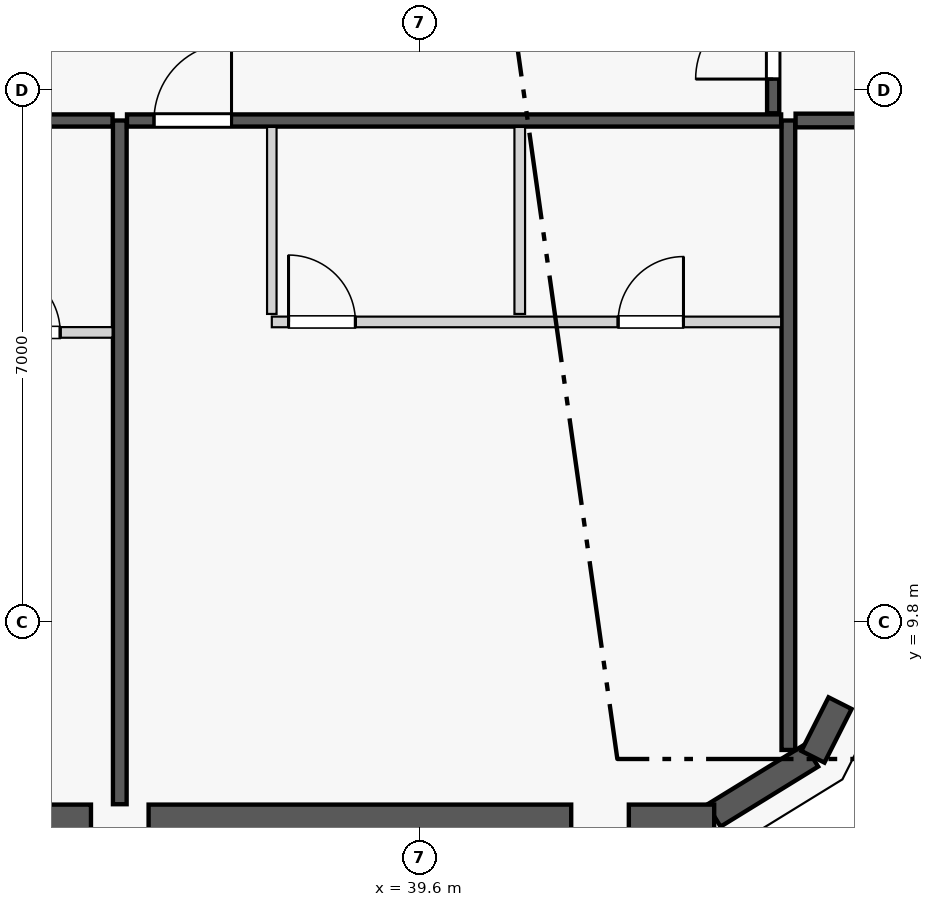
"""IFC4 building model, lengths in metres.
Left out: names, types, materials, properties, quantities, classifications, styles, units other than length and angle.
Written with IfcOpenShell. Run it as: python <this file> out.ifc"""

import sys

from ifc_helpers import new_model, si_unit, direction, frame, frame_2d, origin, origin_2d, place, context, subcontext, project, spatial, rectangle, extrude, element, fill, save


model = new_model("IFC4")
c1 = context("Model", 3, precision=1e-05, world=origin(), true_north=direction((0.0, 1.0)))
c2 = subcontext(c1, "Body", "Model", "MODEL_VIEW")
j1 = project(units=[si_unit("LENGTHUNIT", "METRE"), si_unit("PLANEANGLEUNIT", "RADIAN")], contexts=[c1])
p1 = place(None, origin())
s1 = spatial("IfcSite", under=j1, at=p1, CompositionType="ELEMENT")
p2 = place(p1, origin())
s2 = spatial("IfcBuilding", under=s1, at=p2, CompositionType="ELEMENT")
p3 = place(p2, frame((0.0, 0.0, 241.6)))
s3 = spatial("IfcBuildingStorey", under=s2, at=p3, CompositionType="ELEMENT", Elevation=241.6)
for number, where, z_axis, x_axis in (
    (1, (35.654, 7.292, 0.0), (0.0, 0.0, 1.0), (1.0, 0.0, 0.0)),
    (2, (41.972, 7.239, 0.0), (0.0, 0.0, 1.0), (1.0, 0.0, 0.0)),
    (3, (45.341, 9.191, 0.0), (0.0, 0.0, 1.0), (1.0, 0.0, 0.0)),
):
    element("IfcColumn", number, at=place(p3, frame(where, z_axis=z_axis, x_axis=x_axis)), inside=s3, PredefinedType="COLUMN", context=c2, shape_type="SweptSolid", body=[
        extrude(rectangle(XDim=0.75, YDim=0.75, at=origin_2d()), origin(), (0.0, 0.0, 1.0), 3.65),
    ])
p4 = place(p3, frame((43.657, 8.215, 0.0), z_axis=(0.0, 0.0, 1.0), x_axis=(0.865256437757, 0.501329529272, 0.0)))
e4 = element("IfcColumn", 4, at=p4, inside=s3, PredefinedType="PILASTER", context=c2, shape_type="SweptSolid", body=[
    extrude(rectangle(XDim=0.5, YDim=0.35, at=origin_2d()), origin(), (0.0, 0.0, 1.0), 3.65),
])
p5 = place(p3, frame((43.469, 7.255, 0.0), z_axis=(0.0, 0.0, 1.0), x_axis=(0.851680557619, 0.52406128246, 0.0)))
e5 = element("IfcWall", 5, at=p5, inside=s3, PredefinedType="STANDARD", context=c2, shape_type="SweptSolid", body=[
    extrude(rectangle(XDim=1.508, YDim=0.34, at=frame_2d((0.754, 0.0))), origin(), (0.0, 0.0, 1.0), 3.45),
])
p6 = place(p3, frame((29.525, 7.23, 0.0), z_axis=(0.0, 0.0, 1.0), x_axis=(1.0, 0.0, 0.0)))
e6 = element("IfcWall", 6, at=p6, inside=s3, PredefinedType="STANDARD", context=c2, shape_type="SweptSolid", body=[
    extrude(rectangle(XDim=5.75, YDim=0.34, at=frame_2d((2.875, 0.0))), origin(), (0.0, 0.0, 1.0), 2.983),
])
p7 = place(p6, frame((2.325, 0.0, 0.0)))
e7 = element("IfcOpeningElement", 7, at=p7, cuts=e6, PredefinedType="OPENING", context=c2, shape_type="SweptSolid", body=[
    extrude(rectangle(XDim=1.1, YDim=2.25, at=frame_2d((0.55, 1.125))), frame((0.0, 0.18, 0.0), z_axis=(0.0, -1.0, 0.0), x_axis=(1.0, 0.0, 0.0)), (0.0, 0.0, 1.0), 0.36),
])
p8 = place(p3, frame((36.033, 7.23, 0.0), z_axis=(0.0, 0.0, 1.0), x_axis=(1.0, 0.0, 0.0)))
e8 = element("IfcWall", 8, at=p8, inside=s3, PredefinedType="STANDARD", context=c2, shape_type="SweptSolid", body=[
    extrude(rectangle(XDim=5.56, YDim=0.34, at=frame_2d((2.78, 0.0))), origin(), (0.0, 0.0, 1.0), 2.983),
])
p9 = place(p8, frame((2.23, 0.0, 0.75)))
e9 = element("IfcOpeningElement", 9, at=p9, cuts=e8, PredefinedType="OPENING", context=c2, shape_type="SweptSolid", body=[
    extrude(rectangle(XDim=1.1, YDim=2.0, at=frame_2d((0.55, 1.0))), frame((0.0, 0.18, 0.0), z_axis=(0.0, -1.0, 0.0), x_axis=(1.0, 0.0, 0.0)), (0.0, 0.0, 1.0), 0.36),
])
p10 = place(p3, frame((42.351, 7.23, 0.0), z_axis=(0.0, 0.0, 1.0), x_axis=(1.0, 0.0, 0.0)))
e10 = element("IfcWall", 10, at=p10, inside=s3, PredefinedType="STANDARD", context=c2, shape_type="SweptSolid", body=[
    extrude(rectangle(XDim=1.123, YDim=0.34, at=frame_2d((0.562, 0.0))), origin(), (0.0, 0.0, 1.0), 3.45),
])
p11 = place(p3, frame((44.773, 8.029, 0.0), z_axis=(0.0, 0.0, 1.0), x_axis=(0.451159191899, 0.892443490404, 0.0)))
e11 = element("IfcWall", 11, at=p11, inside=s3, PredefinedType="STANDARD", context=c2, shape_type="SweptSolid", body=[
    extrude(rectangle(XDim=0.791, YDim=0.34, at=frame_2d((0.396, 0.0))), origin(), (0.0, 0.0, 1.0), 3.45),
])
p12 = place(p3, frame((35.654, 7.405, 0.0), z_axis=(0.0, 0.0, 1.0), x_axis=(0.0, 1.0, 0.0)))
e12 = element("IfcWall", 12, at=p12, inside=s3, PredefinedType="PARTITIONING", context=c2, shape_type="SweptSolid", body=[
    extrude(rectangle(XDim=8.995, YDim=0.18, at=frame_2d((4.498, 0.0))), origin(), (0.0, 0.0, 1.0), 2.907),
])
p13 = place(p3, frame((44.45, 8.119, 0.0), z_axis=(0.0, 0.0, 1.0), x_axis=(0.0, 1.0, 0.0)))
e13 = element("IfcWall", 13, at=p13, inside=s3, PredefinedType="PARTITIONING", context=c2, shape_type="SweptSolid", body=[
    extrude(rectangle(XDim=8.281, YDim=0.18, at=frame_2d((4.141, 0.0))), origin(), (0.0, 0.0, 1.0), 3.45),
])
p14 = place(p3, frame((29.241, 16.4, 0.0), z_axis=(0.0, 0.0, 1.0), x_axis=(1.0, 0.0, 0.0)))
e14 = element("IfcWall", 14, at=p14, inside=s3, PredefinedType="PARTITIONING", context=c2, shape_type="SweptSolid", body=[
    extrude(rectangle(XDim=6.318, YDim=0.16, at=frame_2d((3.159, 0.0))), origin(), (0.0, 0.0, 1.0), 3.45),
])
p15 = place(p14, frame((0.355, 0.0, 0.0)))
e15 = element("IfcOpeningElement", 15, at=p15, cuts=e14, PredefinedType="OPENING", context=c2, shape_type="SweptSolid", body=[
    extrude(rectangle(XDim=1.02, YDim=2.25, at=frame_2d((0.51, 1.125))), frame((0.0, 0.09, 0.0), z_axis=(0.0, -1.0, 0.0), x_axis=(1.0, 0.0, 0.0)), (0.0, 0.0, 1.0), 0.18),
])
p16 = place(p3, frame((31.146, 13.612, 0.0), z_axis=(0.0, 0.0, 1.0), x_axis=(1.0, 0.0, 0.0)))
e16 = element("IfcWall", 16, at=p16, inside=s3, PredefinedType="PLUMBINGWALL", context=c2, shape_type="SweptSolid", body=[
    extrude(rectangle(XDim=4.413, YDim=0.14, at=frame_2d((2.207, 0.0))), origin(), (0.0, 0.0, 1.0), 3.45),
])
p17 = place(p16, frame((2.864, 0.0, 0.0)))
e17 = element("IfcOpeningElement", 17, at=p17, cuts=e16, PredefinedType="OPENING", context=c2, shape_type="SweptSolid", body=[
    extrude(rectangle(XDim=0.86, YDim=2.1, at=frame_2d((0.43, 1.05))), frame((0.0, 0.08, 0.0), z_axis=(0.0, -1.0, 0.0), x_axis=(1.0, 0.0, 0.0)), (0.0, 0.0, 1.0), 0.16),
])
p18 = place(p16, frame((0.22, 0.0, 0.0)))
e18 = element("IfcOpeningElement", 18, at=p18, cuts=e16, PredefinedType="OPENING", context=c2, shape_type="SweptSolid", body=[
    extrude(rectangle(XDim=0.88, YDim=2.15, at=frame_2d((0.44, 1.075))), frame((0.0, 0.08, 0.0), z_axis=(0.0, -1.0, 0.0), x_axis=(1.0, 0.0, 0.0)), (0.0, 0.0, 1.0), 0.16),
])
p19 = place(p3, frame((35.749, 16.4, 0.0), z_axis=(0.0, 0.0, 1.0), x_axis=(1.0, 0.0, 0.0)))
e19 = element("IfcWall", 19, at=p19, inside=s3, PredefinedType="PARTITIONING", context=c2, shape_type="SweptSolid", body=[
    extrude(rectangle(XDim=8.606, YDim=0.16, at=frame_2d((4.303, 0.0))), origin(), (0.0, 0.0, 1.0), 3.45),
])
p20 = place(p19, frame((0.355, 0.0, 0.0)))
e20 = element("IfcOpeningElement", 20, at=p20, cuts=e19, PredefinedType="OPENING", context=c2, shape_type="SweptSolid", body=[
    extrude(rectangle(XDim=1.02, YDim=2.25, at=frame_2d((0.51, 1.125))), frame((0.0, 0.09, 0.0), z_axis=(0.0, -1.0, 0.0), x_axis=(1.0, 0.0, 0.0)), (0.0, 0.0, 1.0), 0.18),
])
p21 = place(p3, frame((37.654, 13.855, 0.0), z_axis=(0.0, 0.0, 1.0), x_axis=(0.0, 1.0, 0.0)))
e21 = element("IfcWall", 21, at=p21, inside=s3, PredefinedType="PARTITIONING", context=c2, shape_type="SweptSolid", body=[
    extrude(rectangle(XDim=2.46, YDim=0.125, at=frame_2d((1.23, 0.0))), origin(), (0.0, 0.0, 1.0), 3.45),
])
p22 = place(p3, frame((37.654, 13.75, 0.0), z_axis=(0.0, 0.0, 1.0), x_axis=(1.0, 0.0, 0.0)))
e22 = element("IfcWall", 22, at=p22, inside=s3, PredefinedType="PLUMBINGWALL", context=c2, shape_type="SweptSolid", body=[
    extrude(rectangle(XDim=6.701, YDim=0.14, at=frame_2d((3.351, 0.0))), origin(), (0.0, 0.0, 1.0), 3.45),
])
p23 = place(p22, frame((4.556, 0.0, 0.0)))
e23 = element("IfcOpeningElement", 23, at=p23, cuts=e22, PredefinedType="OPENING", context=c2, shape_type="SweptSolid", body=[
    extrude(rectangle(XDim=0.86, YDim=2.1, at=frame_2d((0.43, 1.05))), frame((0.0, 0.08, 0.0), z_axis=(0.0, -1.0, 0.0), x_axis=(1.0, 0.0, 0.0)), (0.0, 0.0, 1.0), 0.16),
])
p24 = place(p22, frame((0.22, 0.0, 0.0)))
e24 = element("IfcOpeningElement", 24, at=p24, cuts=e22, PredefinedType="OPENING", context=c2, shape_type="SweptSolid", body=[
    extrude(rectangle(XDim=0.88, YDim=2.15, at=frame_2d((0.44, 1.075))), frame((0.0, 0.08, 0.0), z_axis=(0.0, -1.0, 0.0), x_axis=(1.0, 0.0, 0.0)), (0.0, 0.0, 1.0), 0.16),
])
p25 = place(p3, frame((40.916, 13.855, 0.0), z_axis=(0.0, 0.0, 1.0), x_axis=(0.0, 1.0, 0.0)))
e25 = element("IfcWall", 25, at=p25, inside=s3, PredefinedType="PLUMBINGWALL", context=c2, shape_type="SweptSolid", body=[
    extrude(rectangle(XDim=2.46, YDim=0.14, at=frame_2d((1.23, 0.0))), origin(), (0.0, 0.0, 1.0), 3.45),
])
p26 = place(p3, frame((44.545, 16.4, 0.0), z_axis=(0.0, 0.0, 1.0), x_axis=(1.0, 0.0, 0.0)))
e26 = element("IfcWall", 26, at=p26, inside=s3, PredefinedType="PARTITIONING", context=c2, shape_type="SweptSolid", body=[
    extrude(rectangle(XDim=4.221, YDim=0.18, at=frame_2d((2.111, 0.0))), origin(), (0.0, 0.0, 1.0), 3.45),
])
p27 = place(p3, frame((44.25, 16.495, 0.0), z_axis=(0.0, 0.0, 1.0), x_axis=(0.0, 1.0, 0.0)))
e27 = element("IfcWall", 27, at=p27, inside=s3, PredefinedType="PARTITIONING", context=c2, shape_type="SweptSolid", body=[
    extrude(rectangle(XDim=18.41, YDim=0.16, at=frame_2d((9.205, 0.0))), origin(), (0.0, 0.0, 1.0), 3.137),
])
p28 = place(p27, frame((0.45, 0.0, 0.0)))
e28 = element("IfcOpeningElement", 28, at=p28, cuts=e27, PredefinedType="OPENING", context=c2, shape_type="SweptSolid", body=[
    extrude(rectangle(XDim=1.02, YDim=2.25, at=frame_2d((0.51, 1.125))), frame((0.0, 0.09, 0.0), z_axis=(0.0, -1.0, 0.0), x_axis=(1.0, 0.0, 0.0)), (0.0, 0.0, 1.0), 0.18),
])
p29 = place(p9, origin())
e29 = element("IfcWindow", 29, at=p29, inside=s3, PartitioningType="SINGLE_PANEL", PredefinedType="WINDOW", context=c2, shape_type="SweptSolid", body=[
    extrude(rectangle(XDim=1.1, YDim=2.0, at=frame_2d((0.55, 1.0))), frame((0.0, 0.03, 0.0), z_axis=(0.0, -1.0, 0.0), x_axis=(1.0, 0.0, 0.0)), (0.0, 0.0, 1.0), 0.06),
])
fill(e9, e29)
p30 = place(p17, origin())
e30 = element("IfcDoor", 30, at=p30, inside=s3, OperationType="SINGLE_SWING_LEFT", PredefinedType="DOOR", context=c2, shape_type="SweptSolid", body=[
    extrude(rectangle(XDim=0.86, YDim=2.1, at=frame_2d((0.43, 1.05))), frame((0.0, 0.025, 0.0), z_axis=(0.0, -1.0, 0.0), x_axis=(1.0, 0.0, 0.0)), (0.0, 0.0, 1.0), 0.05),
])
fill(e17, e30)
p31 = place(p23, origin())
e31 = element("IfcDoor", 31, at=p31, inside=s3, OperationType="SINGLE_SWING_RIGHT", PredefinedType="DOOR", context=c2, shape_type="SweptSolid", body=[
    extrude(rectangle(XDim=0.86, YDim=2.1, at=frame_2d((0.43, 1.05))), frame((0.0, 0.025, 0.0), z_axis=(0.0, -1.0, 0.0), x_axis=(1.0, 0.0, 0.0)), (0.0, 0.0, 1.0), 0.05),
])
fill(e23, e31)
p32 = place(p20, origin())
e32 = element("IfcDoor", 32, at=p32, inside=s3, OperationType="SINGLE_SWING_RIGHT", PredefinedType="DOOR", context=c2, shape_type="SweptSolid", body=[
    extrude(rectangle(XDim=1.02, YDim=2.25, at=frame_2d((0.51, 1.125))), frame((0.0, 0.025, 0.0), z_axis=(0.0, -1.0, 0.0), x_axis=(1.0, 0.0, 0.0)), (0.0, 0.0, 1.0), 0.05),
])
fill(e20, e32)
p33 = place(p24, origin())
e33 = element("IfcDoor", 33, at=p33, inside=s3, OperationType="SINGLE_SWING_LEFT", PredefinedType="DOOR", context=c2, shape_type="SweptSolid", body=[
    extrude(rectangle(XDim=0.88, YDim=2.15, at=frame_2d((0.44, 1.075))), frame((0.0, 0.025, 0.0), z_axis=(0.0, -1.0, 0.0), x_axis=(1.0, 0.0, 0.0)), (0.0, 0.0, 1.0), 0.05),
])
fill(e24, e33)
p34 = place(p28, origin())
e34 = element("IfcDoor", 34, at=p34, inside=s3, OperationType="SINGLE_SWING_LEFT", PredefinedType="DOOR", context=c2, shape_type="SweptSolid", body=[
    extrude(rectangle(XDim=1.02, YDim=2.25, at=frame_2d((0.51, 1.125))), frame((0.0, 0.025, 0.0), z_axis=(0.0, -1.0, 0.0), x_axis=(1.0, 0.0, 0.0)), (0.0, 0.0, 1.0), 0.05),
])
fill(e28, e34)
save(model, sys.argv[1])
